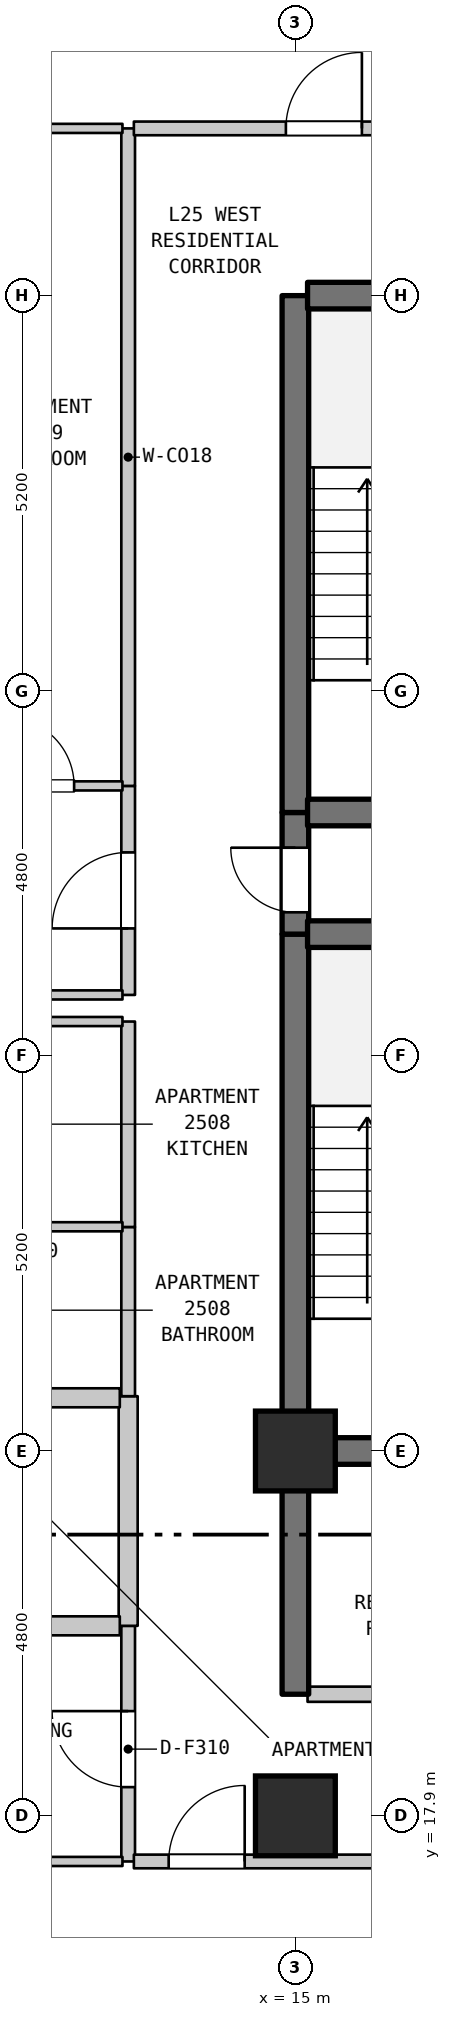
"""IFC4 building model, lengths in metres.
Left out: names, types, materials, properties, quantities, classifications, styles, units other than length and angle.
Written with IfcOpenShell. Run it as: python <this file> out.ifc"""

import sys

from ifc_helpers import new_model, si_unit, direction, frame, frame_2d, origin, origin_2d, place, context, subcontext, project, spatial, rectangle, extrude, element, fill, save


model = new_model("IFC4")
c1 = context("Model", 3, precision=1e-05, world=origin(), true_north=direction((0.0, 1.0)))
c2 = subcontext(c1, "Body", "Model", "MODEL_VIEW")
j1 = project(units=[si_unit("LENGTHUNIT", "METRE"), si_unit("PLANEANGLEUNIT", "RADIAN")], contexts=[c1])
p1 = place(None, origin())
s1 = spatial("IfcSite", under=j1, at=p1, CompositionType="ELEMENT")
p2 = place(p1, origin())
s2 = spatial("IfcBuilding", under=s1, at=p2, CompositionType="ELEMENT")
p3 = place(p2, frame((0.0, 0.0, 105.7)))
s3 = spatial("IfcBuildingStorey", under=s2, at=p3, CompositionType="ELEMENT", Elevation=105.7)
for number, where, z_axis, x_axis in (
    (1, (15.0, 17.9, 0.0), (0.0, 0.0, 1.0), (1.0, 0.0, 0.0)),
    (2, (15.0, 22.7, 0.0), (0.0, 0.0, 1.0), (1.0, 0.0, 0.0)),
):
    element("IfcColumn", number, at=place(p3, frame(where, z_axis=z_axis, x_axis=x_axis)), inside=s3, PredefinedType="COLUMN", context=c2, shape_type="SweptSolid", body=[
        extrude(rectangle(XDim=1.05, YDim=1.05, at=origin_2d()), origin(), (0.0, 0.0, 1.0), 3.7),
    ])
p4 = place(p3, frame((12.8, 17.3, 0.0), z_axis=(0.0, 0.0, 1.0), x_axis=(0.0, 1.0, 0.0)))
e3 = element("IfcWall", 3, at=p4, inside=s3, PredefinedType="STANDARD", context=c2, shape_type="SweptSolid", body=[
    extrude(rectangle(XDim=3.1, YDim=0.18, at=frame_2d((1.55, 0.0))), origin(), (0.0, 0.0, 1.0), 3.385),
])
p5 = place(p4, frame((0.978, 0.0, 0.0)))
e4 = element("IfcOpeningElement", 4, at=p5, cuts=e3, PredefinedType="OPENING", context=c2, shape_type="SweptSolid", body=[
    extrude(rectangle(XDim=1.0, YDim=2.15, at=frame_2d((0.5, 1.075))), frame((0.0, 0.1, 0.0), z_axis=(0.0, -1.0, 0.0), x_axis=(1.0, 0.0, 0.0)), (0.0, 0.0, 1.0), 0.2),
])
p6 = place(p3, frame((12.8, 20.4, 0.0), z_axis=(0.0, 0.0, 1.0), x_axis=(0.0, 1.0, 0.0)))
e5 = element("IfcWall", 5, at=p6, inside=s3, PredefinedType="STANDARD", context=c2, shape_type="SweptSolid", body=[
    extrude(rectangle(XDim=3.021, YDim=0.25, at=frame_2d((1.51, 0.0))), origin(), (0.0, 0.0, 1.0), 3.385),
])
p7 = place(p3, frame((12.8, 23.421, 0.0), z_axis=(0.0, 0.0, 1.0), x_axis=(0.0, 1.0, 0.0)))
e6 = element("IfcWall", 6, at=p7, inside=s3, PredefinedType="STANDARD", context=c2, shape_type="SweptSolid", body=[
    extrude(rectangle(XDim=2.226, YDim=0.18, at=frame_2d((1.113, 0.0))), origin(), (0.0, 0.0, 1.0), 3.385),
])
p8 = place(p3, frame((12.8, 25.647, 0.0), z_axis=(0.0, 0.0, 1.0), x_axis=(0.0, 1.0, 0.0)))
e7 = element("IfcWall", 7, at=p8, inside=s3, PredefinedType="STANDARD", context=c2, shape_type="SweptSolid", body=[
    extrude(rectangle(XDim=2.703, YDim=0.18, at=frame_2d((1.352, 0.0))), origin(), (0.0, 0.0, 1.0), 3.385),
])
p9 = place(p3, frame((12.8, 28.7, 0.0), z_axis=(0.0, 0.0, 1.0), x_axis=(0.0, 1.0, 0.0)))
e8 = element("IfcWall", 8, at=p9, inside=s3, PredefinedType="STANDARD", context=c2, shape_type="SweptSolid", body=[
    extrude(rectangle(XDim=2.75, YDim=0.18, at=frame_2d((1.375, 0.0))), origin(), (0.0, 0.0, 1.0), 3.385),
])
p10 = place(p9, frame((0.875, 0.0, 0.0)))
e9 = element("IfcOpeningElement", 9, at=p10, cuts=e8, PredefinedType="OPENING", context=c2, shape_type="SweptSolid", body=[
    extrude(rectangle(XDim=1.0, YDim=2.15, at=frame_2d((0.5, 1.075))), frame((0.0, 0.1, 0.0), z_axis=(0.0, -1.0, 0.0), x_axis=(1.0, 0.0, 0.0)), (0.0, 0.0, 1.0), 0.2),
])
p11 = place(p3, frame((12.8, 31.45, 0.0), z_axis=(0.0, 0.0, 1.0), x_axis=(0.0, 1.0, 0.0)))
e10 = element("IfcWall", 10, at=p11, inside=s3, PredefinedType="STANDARD", context=c2, shape_type="SweptSolid", body=[
    extrude(rectangle(XDim=8.65, YDim=0.18, at=frame_2d((4.325, 0.0))), origin(), (0.0, 0.0, 1.0), 3.385),
])
p12 = place(p3, frame((15.0, 19.5, 0.0), z_axis=(0.0, 0.0, 1.0), x_axis=(0.0, 1.0, 0.0)))
e11 = element("IfcWall", 11, at=p12, inside=s3, PredefinedType="SHEAR", context=c2, shape_type="SweptSolid", body=[
    extrude(rectangle(XDim=3.2, YDim=0.35, at=frame_2d((1.6, 0.0))), origin(), (0.0, 0.0, 1.0), 3.385),
])
p13 = place(p3, frame((15.0, 22.7, 0.0), z_axis=(0.0, 0.0, 1.0), x_axis=(0.0, 1.0, 0.0)))
e12 = element("IfcWall", 12, at=p13, inside=s3, PredefinedType="SHEAR", context=c2, shape_type="SweptSolid", body=[
    extrude(rectangle(XDim=6.8, YDim=0.35, at=frame_2d((3.4, 0.0))), origin(), (0.0, 0.0, 1.0), 3.385),
])
p14 = place(p3, frame((15.0, 29.5, 0.0), z_axis=(0.0, 0.0, 1.0), x_axis=(0.0, 1.0, 0.0)))
e13 = element("IfcWall", 13, at=p14, inside=s3, PredefinedType="SHEAR", context=c2, shape_type="SweptSolid", body=[
    extrude(rectangle(XDim=1.6, YDim=0.35, at=frame_2d((0.8, 0.0))), origin(), (0.0, 0.0, 1.0), 3.385),
])
p15 = place(p14, frame((0.287, 0.0, 0.0)))
e14 = element("IfcOpeningElement", 14, at=p15, cuts=e13, PredefinedType="OPENING", context=c2, shape_type="SweptSolid", body=[
    extrude(rectangle(XDim=0.85, YDim=2.1, at=frame_2d((0.425, 1.05))), frame((0.0, 0.185, 0.0), z_axis=(0.0, -1.0, 0.0), x_axis=(1.0, 0.0, 0.0)), (0.0, 0.0, 1.0), 0.37),
])
p16 = place(p3, frame((15.0, 31.1, 0.0), z_axis=(0.0, 0.0, 1.0), x_axis=(0.0, 1.0, 0.0)))
e15 = element("IfcWall", 15, at=p16, inside=s3, PredefinedType="SHEAR", context=c2, shape_type="SweptSolid", body=[
    extrude(rectangle(XDim=6.8, YDim=0.35, at=frame_2d((3.4, 0.0))), origin(), (0.0, 0.0, 1.0), 3.385),
])
p17 = place(p3, frame((9.085, 17.3, 0.0), z_axis=(0.0, 0.0, 1.0), x_axis=(1.0, 0.0, 0.0)))
e16 = element("IfcWall", 16, at=p17, inside=s3, PredefinedType="PARTITIONING", context=c2, shape_type="SweptSolid", body=[
    extrude(rectangle(XDim=3.64, YDim=0.12, at=frame_2d((1.82, 0.0))), origin(), (0.0, 0.0, 1.0), 3.385),
])
p18 = place(p3, frame((12.875, 17.3, 0.0), z_axis=(0.0, 0.0, 1.0), x_axis=(1.0, 0.0, 0.0)))
e17 = element("IfcWall", 17, at=p18, inside=s3, PredefinedType="STANDARD", context=c2, shape_type="SweptSolid", body=[
    extrude(rectangle(XDim=3.78, YDim=0.18, at=frame_2d((1.89, 0.0))), origin(), (0.0, 0.0, 1.0), 3.385),
])
p19 = place(p18, frame((0.458, 0.0, 0.0)))
e18 = element("IfcOpeningElement", 18, at=p19, cuts=e17, PredefinedType="OPENING", context=c2, shape_type="SweptSolid", body=[
    extrude(rectangle(XDim=1.0, YDim=2.15, at=frame_2d((0.5, 1.075))), frame((0.0, 0.1, 0.0), z_axis=(0.0, -1.0, 0.0), x_axis=(1.0, 0.0, 0.0)), (0.0, 0.0, 1.0), 0.2),
])
p20 = place(p3, frame((15.16, 19.5, 0.0), z_axis=(0.0, 0.0, 1.0), x_axis=(1.0, 0.0, 0.0)))
e19 = element("IfcWall", 19, at=p20, inside=s3, PredefinedType="STANDARD", context=c2, shape_type="SweptSolid", body=[
    extrude(rectangle(XDim=3.68, YDim=0.2, at=frame_2d((1.84, 0.0))), origin(), (0.0, 0.0, 1.0), 3.385),
])
p21 = place(p20, frame((1.39, 0.0, 0.0)))
e20 = element("IfcOpeningElement", 20, at=p21, cuts=e19, PredefinedType="OPENING", context=c2, shape_type="SweptSolid", body=[
    extrude(rectangle(XDim=0.9, YDim=2.15, at=frame_2d((0.45, 1.075))), frame((0.0, 0.11, 0.0), z_axis=(0.0, -1.0, 0.0), x_axis=(1.0, 0.0, 0.0)), (0.0, 0.0, 1.0), 0.22),
])
p22 = place(p3, frame((10.66, 20.4, 0.0), z_axis=(0.0, 0.0, 1.0), x_axis=(1.0, 0.0, 0.0)))
e21 = element("IfcWall", 21, at=p22, inside=s3, PredefinedType="STANDARD", context=c2, shape_type="SweptSolid", body=[
    extrude(rectangle(XDim=2.03, YDim=0.25, at=frame_2d((1.015, 0.0))), origin(), (0.0, 0.0, 1.0), 3.385),
])
p23 = place(p3, frame((15.16, 22.7, 0.0), z_axis=(0.0, 0.0, 1.0), x_axis=(1.0, 0.0, 0.0)))
e22 = element("IfcWall", 22, at=p23, inside=s3, PredefinedType="SHEAR", context=c2, shape_type="SweptSolid", body=[
    extrude(rectangle(XDim=3.68, YDim=0.35, at=frame_2d((1.84, 0.0))), origin(), (0.0, 0.0, 1.0), 3.385),
])
p24 = place(p3, frame((10.66, 23.4, 0.0), z_axis=(0.0, 0.0, 1.0), x_axis=(1.0, 0.0, 0.0)))
e23 = element("IfcWall", 23, at=p24, inside=s3, PredefinedType="STANDARD", context=c2, shape_type="SweptSolid", body=[
    extrude(rectangle(XDim=2.03, YDim=0.25, at=frame_2d((1.015, 0.0))), origin(), (0.0, 0.0, 1.0), 3.385),
])
for number, where, z_axis, x_axis in (
    (24, (10.595, 25.65, 0.0), (0.0, 0.0, 1.0), (1.0, 0.0, 0.0)),
    (25, (10.595, 28.35, 0.0), (0.0, 0.0, 1.0), (1.0, 0.0, 0.0)),
):
    element("IfcWall", number, at=place(p3, frame(where, z_axis=z_axis, x_axis=x_axis)), inside=s3, PredefinedType="PARTITIONING", context=c2, shape_type="SweptSolid", body=[
        extrude(rectangle(XDim=2.13, YDim=0.12, at=frame_2d((1.065, 0.0))), origin(), (0.0, 0.0, 1.0), 3.385),
    ])
p25 = place(p3, frame((9.03, 28.7, 0.0), z_axis=(0.0, 0.0, 1.0), x_axis=(1.0, 0.0, 0.0)))
e26 = element("IfcWall", 26, at=p25, inside=s3, PredefinedType="PARTITIONING", context=c2, shape_type="SweptSolid", body=[
    extrude(rectangle(XDim=3.695, YDim=0.12, at=frame_2d((1.848, 0.0))), origin(), (0.0, 0.0, 1.0), 3.385),
])
for number, where, z_axis, x_axis in (
    (27, (15.16, 29.5, 0.0), (0.0, 0.0, 1.0), (1.0, 0.0, 0.0)),
    (28, (15.16, 31.1, 0.0), (0.0, 0.0, 1.0), (1.0, 0.0, 0.0)),
):
    element("IfcWall", number, at=place(p3, frame(where, z_axis=z_axis, x_axis=x_axis)), inside=s3, PredefinedType="SHEAR", context=c2, shape_type="SweptSolid", body=[
        extrude(rectangle(XDim=3.68, YDim=0.35, at=frame_2d((1.84, 0.0))), origin(), (0.0, 0.0, 1.0), 3.385),
    ])
p26 = place(p3, frame((10.523, 31.45, 0.0), z_axis=(0.0, 0.0, 1.0), x_axis=(1.0, 0.0, 0.0)))
e29 = element("IfcWall", 29, at=p26, inside=s3, PredefinedType="PARTITIONING", context=c2, shape_type="SweptSolid", body=[
    extrude(rectangle(XDim=2.202, YDim=0.12, at=frame_2d((1.101, 0.0))), origin(), (0.0, 0.0, 1.0), 3.385),
])
p27 = place(p26, frame((0.666, 0.0, 0.0)))
e30 = element("IfcOpeningElement", 30, at=p27, cuts=e29, PredefinedType="OPENING", context=c2, shape_type="SweptSolid", body=[
    extrude(rectangle(XDim=0.9, YDim=2.1, at=frame_2d((0.45, 1.05))), frame((0.0, 0.07, 0.0), z_axis=(0.0, -1.0, 0.0), x_axis=(1.0, 0.0, 0.0)), (0.0, 0.0, 1.0), 0.14),
])
p28 = place(p3, frame((15.16, 37.9, 0.0), z_axis=(0.0, 0.0, 1.0), x_axis=(1.0, 0.0, 0.0)))
e31 = element("IfcWall", 31, at=p28, inside=s3, PredefinedType="SHEAR", context=c2, shape_type="SweptSolid", body=[
    extrude(rectangle(XDim=3.68, YDim=0.35, at=frame_2d((1.84, 0.0))), origin(), (0.0, 0.0, 1.0), 3.385),
])
p29 = place(p3, frame((10.523, 40.1, 0.0), z_axis=(0.0, 0.0, 1.0), x_axis=(1.0, 0.0, 0.0)))
e32 = element("IfcWall", 32, at=p29, inside=s3, PredefinedType="PARTITIONING", context=c2, shape_type="SweptSolid", body=[
    extrude(rectangle(XDim=2.202, YDim=0.12, at=frame_2d((1.101, 0.0))), origin(), (0.0, 0.0, 1.0), 3.385),
])
p30 = place(p3, frame((12.875, 40.1, 0.0), z_axis=(0.0, 0.0, 1.0), x_axis=(1.0, 0.0, 0.0)))
e33 = element("IfcWall", 33, at=p30, inside=s3, PredefinedType="STANDARD", context=c2, shape_type="SweptSolid", body=[
    extrude(rectangle(XDim=5.03, YDim=0.18, at=frame_2d((2.515, 0.0))), origin(), (0.0, 0.0, 1.0), 3.385),
])
p31 = place(p30, frame((2.0, 0.0, 0.0)))
e34 = element("IfcOpeningElement", 34, at=p31, cuts=e33, PredefinedType="OPENING", context=c2, shape_type="SweptSolid", body=[
    extrude(rectangle(XDim=1.0, YDim=2.15, at=frame_2d((0.5, 1.075))), frame((0.0, 0.1, 0.0), z_axis=(0.0, -1.0, 0.0), x_axis=(1.0, 0.0, 0.0)), (0.0, 0.0, 1.0), 0.2),
])
p32 = place(p5, origin())
e35 = element("IfcDoor", 35, at=p32, inside=s3, OperationType="SINGLE_SWING_RIGHT", PredefinedType="DOOR", context=c2, shape_type="SweptSolid", body=[
    extrude(rectangle(XDim=1.0, YDim=2.15, at=frame_2d((0.5, 1.075))), frame((0.0, 0.025, 0.0), z_axis=(0.0, -1.0, 0.0), x_axis=(1.0, 0.0, 0.0)), (0.0, 0.0, 1.0), 0.05),
])
fill(e4, e35)
p33 = place(p10, origin())
e36 = element("IfcDoor", 36, at=p33, inside=s3, OperationType="SINGLE_SWING_LEFT", PredefinedType="DOOR", context=c2, shape_type="SweptSolid", body=[
    extrude(rectangle(XDim=1.0, YDim=2.15, at=frame_2d((0.5, 1.075))), frame((0.0, 0.025, 0.0), z_axis=(0.0, -1.0, 0.0), x_axis=(1.0, 0.0, 0.0)), (0.0, 0.0, 1.0), 0.05),
])
fill(e9, e36)
p34 = place(p15, origin())
e37 = element("IfcDoor", 37, at=p34, inside=s3, OperationType="SINGLE_SWING_RIGHT", PredefinedType="DOOR", context=c2, shape_type="SweptSolid", body=[
    extrude(rectangle(XDim=0.85, YDim=2.1, at=frame_2d((0.425, 1.05))), frame((0.0, 0.025, 0.0), z_axis=(0.0, -1.0, 0.0), x_axis=(1.0, 0.0, 0.0)), (0.0, 0.0, 1.0), 0.05),
])
fill(e14, e37)
p35 = place(p19, origin())
e38 = element("IfcDoor", 38, at=p35, inside=s3, OperationType="SINGLE_SWING_RIGHT", PredefinedType="DOOR", context=c2, shape_type="SweptSolid", body=[
    extrude(rectangle(XDim=1.0, YDim=2.15, at=frame_2d((0.5, 1.075))), frame((0.0, 0.025, 0.0), z_axis=(0.0, -1.0, 0.0), x_axis=(1.0, 0.0, 0.0)), (0.0, 0.0, 1.0), 0.05),
])
fill(e18, e38)
p36 = place(p27, origin())
e39 = element("IfcDoor", 39, at=p36, inside=s3, OperationType="SINGLE_SWING_LEFT", PredefinedType="DOOR", context=c2, shape_type="SweptSolid", body=[
    extrude(rectangle(XDim=0.9, YDim=2.1, at=frame_2d((0.45, 1.05))), frame((0.0, 0.025, 0.0), z_axis=(0.0, -1.0, 0.0), x_axis=(1.0, 0.0, 0.0)), (0.0, 0.0, 1.0), 0.05),
])
fill(e30, e39)
p37 = place(p31, origin())
e40 = element("IfcDoor", 40, at=p37, inside=s3, OperationType="SINGLE_SWING_RIGHT", PredefinedType="DOOR", context=c2, shape_type="SweptSolid", body=[
    extrude(rectangle(XDim=1.0, YDim=2.15, at=frame_2d((0.5, 1.075))), frame((0.0, 0.025, 0.0), z_axis=(0.0, -1.0, 0.0), x_axis=(1.0, 0.0, 0.0)), (0.0, 0.0, 1.0), 0.05),
])
fill(e34, e40)
save(model, sys.argv[1])
